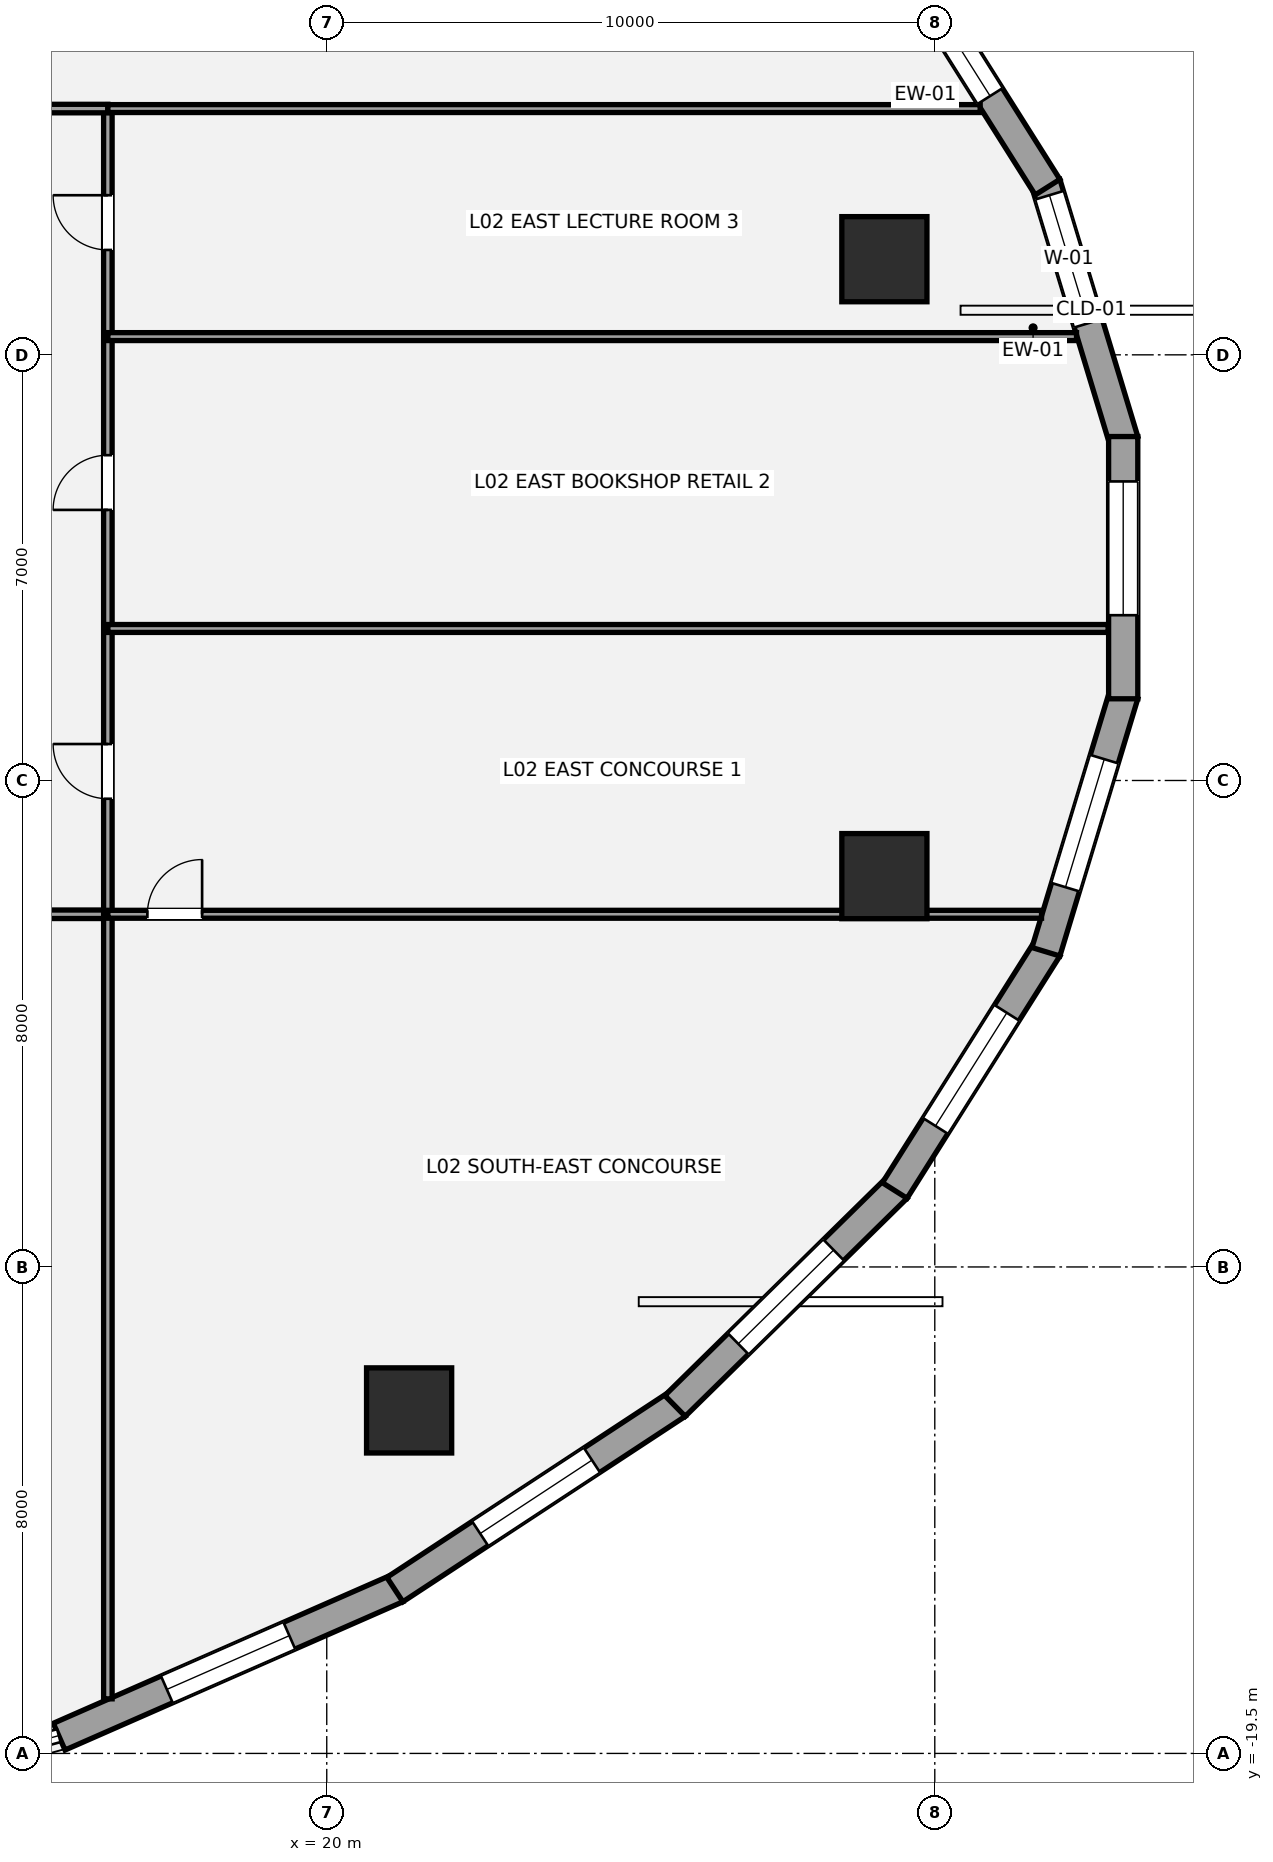
"""IFC4 building model, lengths in metres.
Left out: names, types, materials, properties, quantities, classifications, styles, units other than length and angle.
Written with IfcOpenShell. Run it as: python <this file> out.ifc"""

import sys

from ifc_helpers import new_model, si_unit, direction, frame, frame_2d, origin, origin_2d, place, context, subcontext, project, spatial, rectangle, hollow_circle, extrude, element, fill, save


model = new_model("IFC4")
c1 = context("Model", 3, precision=1e-05, world=origin(), true_north=direction((0.0, 1.0)))
c2 = subcontext(c1, "Body", "Model", "MODEL_VIEW")
j1 = project(units=[si_unit("LENGTHUNIT", "METRE"), si_unit("PLANEANGLEUNIT", "RADIAN")], contexts=[c1])
p1 = place(None, origin())
s1 = spatial("IfcSite", under=j1, at=p1, CompositionType="ELEMENT")
p2 = place(p1, origin())
s2 = spatial("IfcBuilding", under=s1, at=p2, CompositionType="ELEMENT")
p3 = place(p2, frame((0.0, 0.0, 10.2)))
s3 = spatial("IfcBuildingStorey", under=s2, at=p3, CompositionType="ELEMENT", Elevation=10.2)
for number, where, z_axis, x_axis in (
    (1, (29.171, 5.073, 0.0), (0.0, 0.0, 1.0), (1.0, 0.0, 0.0)),
    (2, (21.354, -13.859, 0.0), (0.0, 0.0, 1.0), (1.0, 0.0, 0.0)),
    (3, (29.171, -5.073, 0.0), (0.0, 0.0, 1.0), (1.0, 0.0, 0.0)),
):
    element("IfcColumn", number, at=place(p3, frame(where, z_axis=z_axis, x_axis=x_axis)), inside=s3, PredefinedType="USERDEFINED", context=c2, shape_type="SweptSolid", body=[
        extrude(hollow_circle(Radius=0.7, WallThickness=0.05, at=origin_2d()), origin(), (0.0, 0.0, 1.0), 4.2),
    ])
p4 = place(p3, frame((31.828, 6.317, 0.0), z_axis=(0.0, 0.0, 1.0), x_axis=(0.289855603468, -0.957070388811, 0.0)))
e4 = element("IfcWall", 4, at=p4, inside=s3, PredefinedType="STANDARD", context=c2, shape_type="SweptSolid", body=[
    extrude(rectangle(XDim=4.419, YDim=0.48, at=frame_2d((2.21, 0.0))), origin(), (0.0, 0.0, 1.0), 3.109),
])
p5 = place(p4, frame((0.2, 0.0, 0.7)))
e5 = element("IfcOpeningElement", 5, at=p5, cuts=e4, PredefinedType="OPENING", context=c2, shape_type="SweptSolid", body=[
    extrude(rectangle(XDim=2.2, YDim=1.95, at=frame_2d((1.1, 0.975))), frame((0.0, 0.25, 0.0), z_axis=(0.0, -1.0, 0.0), x_axis=(1.0, 0.0, 0.0)), (0.0, 0.0, 1.0), 0.5),
])
p6 = place(p3, frame((29.341, 10.243, 0.0), z_axis=(0.0, 0.0, 1.0), x_axis=(0.53349762721, -0.845801561693, 0.0)))
e6 = element("IfcWall", 6, at=p6, inside=s3, PredefinedType="STANDARD", context=c2, shape_type="SweptSolid", body=[
    extrude(rectangle(XDim=4.711, YDim=0.48, at=frame_2d((2.355, 0.0))), origin(), (0.0, 0.0, 1.0), 3.109),
])
p7 = place(p6, frame((0.74, 0.0, 0.7)))
e7 = element("IfcOpeningElement", 7, at=p7, cuts=e6, PredefinedType="OPENING", context=c2, shape_type="SweptSolid", body=[
    extrude(rectangle(XDim=2.2, YDim=1.95, at=frame_2d((1.1, 0.975))), frame((0.0, 0.25, 0.0), z_axis=(0.0, -1.0, 0.0), x_axis=(1.0, 0.0, 0.0)), (0.0, 0.0, 1.0), 0.5),
])
p8 = place(p3, frame((21.156, -16.786, 0.0), z_axis=(0.0, 0.0, 1.0), x_axis=(-0.915720949248, -0.401814811957, 0.0)))
e8 = element("IfcWall", 8, at=p8, inside=s3, PredefinedType="STANDARD", context=c2, shape_type="SweptSolid", body=[
    extrude(rectangle(XDim=6.068, YDim=0.48, at=frame_2d((3.034, 0.0))), origin(), (0.0, 0.0, 1.0), 3.109),
])
p9 = place(p8, frame((1.934, 0.0, 0.7)))
e9 = element("IfcOpeningElement", 9, at=p9, cuts=e8, PredefinedType="OPENING", context=c2, shape_type="SweptSolid", body=[
    extrude(rectangle(XDim=2.2, YDim=1.95, at=frame_2d((1.1, 0.975))), frame((0.0, 0.25, 0.0), z_axis=(0.0, -1.0, 0.0), x_axis=(1.0, 0.0, 0.0)), (0.0, 0.0, 1.0), 0.5),
])
p10 = place(p3, frame((25.764, -13.756, 0.0), z_axis=(0.0, 0.0, 1.0), x_axis=(-0.835863918172, -0.548936708827, 0.0)))
e10 = element("IfcWall", 10, at=p10, inside=s3, PredefinedType="STANDARD", context=c2, shape_type="SweptSolid", body=[
    extrude(rectangle(XDim=5.555, YDim=0.48, at=frame_2d((2.778, 0.0))), origin(), (0.0, 0.0, 1.0), 3.109),
])
p11 = place(p10, frame((1.678, 0.0, 0.7)))
e11 = element("IfcOpeningElement", 11, at=p11, cuts=e10, PredefinedType="OPENING", context=c2, shape_type="SweptSolid", body=[
    extrude(rectangle(XDim=2.2, YDim=1.95, at=frame_2d((1.1, 0.975))), frame((0.0, 0.25, 0.0), z_axis=(0.0, -1.0, 0.0), x_axis=(1.0, 0.0, 0.0)), (0.0, 0.0, 1.0), 0.5),
])
p12 = place(p3, frame((29.376, -10.199, 0.0), z_axis=(0.0, 0.0, 1.0), x_axis=(-0.713189080178, -0.700971708355, 0.0)))
e12 = element("IfcWall", 12, at=p12, inside=s3, PredefinedType="STANDARD", context=c2, shape_type="SweptSolid", body=[
    extrude(rectangle(XDim=5.116, YDim=0.48, at=frame_2d((2.558, 0.0))), origin(), (0.0, 0.0, 1.0), 3.109),
])
p13 = place(p12, frame((1.458, 0.0, 0.7)))
e13 = element("IfcOpeningElement", 13, at=p13, cuts=e12, PredefinedType="OPENING", context=c2, shape_type="SweptSolid", body=[
    extrude(rectangle(XDim=2.2, YDim=1.95, at=frame_2d((1.1, 0.975))), frame((0.0, 0.25, 0.0), z_axis=(0.0, -1.0, 0.0), x_axis=(1.0, 0.0, 0.0)), (0.0, 0.0, 1.0), 0.5),
])
p14 = place(p3, frame((31.854, -6.258, 0.0), z_axis=(0.0, 0.0, 1.0), x_axis=(-0.53349762721, -0.845801561693, 0.0)))
e14 = element("IfcWall", 14, at=p14, inside=s3, PredefinedType="STANDARD", context=c2, shape_type="SweptSolid", body=[
    extrude(rectangle(XDim=4.711, YDim=0.48, at=frame_2d((2.355, 0.0))), origin(), (0.0, 0.0, 1.0), 3.109),
])
p15 = place(p14, frame((1.255, 0.0, 0.7)))
e15 = element("IfcOpeningElement", 15, at=p15, cuts=e14, PredefinedType="OPENING", context=c2, shape_type="SweptSolid", body=[
    extrude(rectangle(XDim=2.2, YDim=1.95, at=frame_2d((1.1, 0.975))), frame((0.0, 0.25, 0.0), z_axis=(0.0, -1.0, 0.0), x_axis=(1.0, 0.0, 0.0)), (0.0, 0.0, 1.0), 0.5),
])
p16 = place(p3, frame((33.109, -2.087, 0.0), z_axis=(0.0, 0.0, 1.0), x_axis=(-0.289855603468, -0.957070388811, 0.0)))
e16 = element("IfcWall", 16, at=p16, inside=s3, PredefinedType="STANDARD", context=c2, shape_type="SweptSolid", body=[
    extrude(rectangle(XDim=4.419, YDim=0.48, at=frame_2d((2.21, 0.0))), origin(), (0.0, 0.0, 1.0), 3.109),
])
p17 = place(p16, frame((1.11, 0.0, 0.7)))
e17 = element("IfcOpeningElement", 17, at=p17, cuts=e16, PredefinedType="OPENING", context=c2, shape_type="SweptSolid", body=[
    extrude(rectangle(XDim=2.2, YDim=1.95, at=frame_2d((1.1, 0.975))), frame((0.0, 0.25, 0.0), z_axis=(0.0, -1.0, 0.0), x_axis=(1.0, 0.0, 0.0)), (0.0, 0.0, 1.0), 0.5),
])
p18 = place(p3, frame((33.099, 2.156, 0.0), z_axis=(0.0, 0.0, 1.0), x_axis=(0.0, -1.0, 0.0)))
e18 = element("IfcWall", 18, at=p18, inside=s3, PredefinedType="STANDARD", context=c2, shape_type="SweptSolid", body=[
    extrude(rectangle(XDim=4.313, YDim=0.48, at=frame_2d((2.156, 0.0))), origin(), (0.0, 0.0, 1.0), 3.109),
])
p19 = place(p18, frame((0.738, 0.0, 0.7)))
e19 = element("IfcOpeningElement", 19, at=p19, cuts=e18, PredefinedType="OPENING", context=c2, shape_type="SweptSolid", body=[
    extrude(rectangle(XDim=2.2, YDim=1.95, at=frame_2d((1.1, 0.975))), frame((0.0, 0.25, 0.0), z_axis=(0.0, -1.0, 0.0), x_axis=(1.0, 0.0, 0.0)), (0.0, 0.0, 1.0), 0.5),
])
p20 = place(p3, frame((-16.4, -5.7, 0.0), z_axis=(0.0, 0.0, 1.0), x_axis=(1.0, 0.0, 0.0)))
e20 = element("IfcWall", 20, at=p20, inside=s3, PredefinedType="PARTITIONING", context=c2, shape_type="SweptSolid", body=[
    extrude(rectangle(XDim=32.8, YDim=0.14, at=frame_2d((16.4, 0.0))), origin(), (0.0, 0.0, 1.0), 3.98),
])
p21 = place(p20, frame((4.55, 0.0, 0.0)))
e21 = element("IfcOpeningElement", 21, at=p21, cuts=e20, PredefinedType="OPENING", context=c2, shape_type="SweptSolid", body=[
    extrude(rectangle(XDim=0.9, YDim=2.1, at=frame_2d((0.45, 1.05))), frame((0.0, 0.08, 0.0), z_axis=(0.0, -1.0, 0.0), x_axis=(1.0, 0.0, 0.0)), (0.0, 0.0, 1.0), 0.16),
])
p22 = place(p20, frame((15.95, 0.0, 0.0)))
e22 = element("IfcOpeningElement", 22, at=p22, cuts=e20, PredefinedType="OPENING", context=c2, shape_type="SweptSolid", body=[
    extrude(rectangle(XDim=0.9, YDim=2.1, at=frame_2d((0.45, 1.05))), frame((0.0, 0.08, 0.0), z_axis=(0.0, -1.0, 0.0), x_axis=(1.0, 0.0, 0.0)), (0.0, 0.0, 1.0), 0.16),
])
p23 = place(p20, frame((27.05, 0.0, 0.0)))
e23 = element("IfcOpeningElement", 23, at=p23, cuts=e20, PredefinedType="OPENING", context=c2, shape_type="SweptSolid", body=[
    extrude(rectangle(XDim=1.5, YDim=2.15, at=frame_2d((0.75, 1.075))), frame((0.0, 0.08, 0.0), z_axis=(0.0, -1.0, 0.0), x_axis=(1.0, 0.0, 0.0)), (0.0, 0.0, 1.0), 0.16),
])
p24 = place(p3, frame((16.4, -18.603, 0.0), z_axis=(0.0, 0.0, 1.0), x_axis=(0.0, 1.0, 0.0)))
e24 = element("IfcWall", 24, at=p24, inside=s3, PredefinedType="PARTITIONING", context=c2, shape_type="SweptSolid", body=[
    extrude(rectangle(XDim=26.153, YDim=0.14, at=frame_2d((13.076, 0.0))), origin(), (0.0, 0.0, 1.0), 3.348),
])
p25 = place(p24, frame((14.802, 0.0, 0.0)))
e25 = element("IfcOpeningElement", 25, at=p25, cuts=e24, PredefinedType="OPENING", context=c2, shape_type="SweptSolid", body=[
    extrude(rectangle(XDim=0.9, YDim=2.1, at=frame_2d((0.45, 1.05))), frame((0.0, 0.08, 0.0), z_axis=(0.0, -1.0, 0.0), x_axis=(1.0, 0.0, 0.0)), (0.0, 0.0, 1.0), 0.16),
])
p26 = place(p24, frame((19.552, 0.0, 0.0)))
e26 = element("IfcOpeningElement", 26, at=p26, cuts=e24, PredefinedType="OPENING", context=c2, shape_type="SweptSolid", body=[
    extrude(rectangle(XDim=0.9, YDim=2.1, at=frame_2d((0.45, 1.05))), frame((0.0, 0.08, 0.0), z_axis=(0.0, -1.0, 0.0), x_axis=(1.0, 0.0, 0.0)), (0.0, 0.0, 1.0), 0.16),
])
p27 = place(p24, frame((23.827, 0.0, 0.0)))
e27 = element("IfcOpeningElement", 27, at=p27, cuts=e24, PredefinedType="OPENING", context=c2, shape_type="SweptSolid", body=[
    extrude(rectangle(XDim=0.9, YDim=2.1, at=frame_2d((0.45, 1.05))), frame((0.0, 0.08, 0.0), z_axis=(0.0, -1.0, 0.0), x_axis=(1.0, 0.0, 0.0)), (0.0, 0.0, 1.0), 0.16),
])
p28 = place(p3, frame((14.05, 7.55, 0.0), z_axis=(0.0, 0.0, 1.0), x_axis=(1.0, 0.0, 0.0)))
e28 = element("IfcWall", 28, at=p28, inside=s3, PredefinedType="PARTITIONING", context=c2, shape_type="SweptSolid", body=[
    extrude(rectangle(XDim=2.35, YDim=0.14, at=frame_2d((1.175, 0.0))), origin(), (0.0, 0.0, 1.0), 3.433),
])
p29 = place(p28, frame((0.32, 0.0, 0.0)))
e29 = element("IfcOpeningElement", 29, at=p29, cuts=e28, PredefinedType="OPENING", context=c2, shape_type="SweptSolid", body=[
    extrude(rectangle(XDim=0.92, YDim=2.15, at=frame_2d((0.46, 1.075))), frame((0.0, 0.08, 0.0), z_axis=(0.0, -1.0, 0.0), x_axis=(1.0, 0.0, 0.0)), (0.0, 0.0, 1.0), 0.16),
])
p30 = place(p3, frame((16.4, 7.55, 0.0), z_axis=(0.0, 0.0, 1.0), x_axis=(1.0, 0.0, 0.0)))
e30 = element("IfcWall", 30, at=p30, inside=s3, PredefinedType="PARTITIONING", context=c2, shape_type="SweptSolid", body=[
    extrude(rectangle(XDim=14.347, YDim=0.13, at=frame_2d((7.173, 0.0))), origin(), (0.0, 0.0, 1.0), 2.958),
])
p31 = place(p3, frame((16.4, -5.7, 0.0), z_axis=(0.0, 0.0, 1.0), x_axis=(1.0, 0.0, 0.0)))
e31 = element("IfcWall", 31, at=p31, inside=s3, PredefinedType="PARTITIONING", context=c2, shape_type="SweptSolid", body=[
    extrude(rectangle(XDim=15.356, YDim=0.13, at=frame_2d((7.678, 0.0))), origin(), (0.0, 0.0, 1.0), 2.958),
])
p32 = place(p31, frame((0.65, 0.0, 0.0)))
e32 = element("IfcOpeningElement", 32, at=p32, cuts=e31, PredefinedType="OPENING", context=c2, shape_type="SweptSolid", body=[
    extrude(rectangle(XDim=0.9, YDim=2.1, at=frame_2d((0.45, 1.05))), frame((0.0, 0.075, 0.0), z_axis=(0.0, -1.0, 0.0), x_axis=(1.0, 0.0, 0.0)), (0.0, 0.0, 1.0), 0.15),
])
p33 = place(p3, frame((16.4, -1.0, 0.0), z_axis=(0.0, 0.0, 1.0), x_axis=(1.0, 0.0, 0.0)))
e33 = element("IfcWall", 33, at=p33, inside=s3, PredefinedType="PARTITIONING", context=c2, shape_type="SweptSolid", body=[
    extrude(rectangle(XDim=16.451, YDim=0.13, at=frame_2d((8.225, 0.0))), origin(), (0.0, 0.0, 1.0), 3.348),
])
p34 = place(p3, frame((16.4, 3.8, 0.0), z_axis=(0.0, 0.0, 1.0), x_axis=(1.0, 0.0, 0.0)))
e34 = element("IfcWall", 34, at=p34, inside=s3, PredefinedType="PARTITIONING", context=c2, shape_type="SweptSolid", body=[
    extrude(rectangle(XDim=15.931, YDim=0.13, at=frame_2d((7.966, 0.0))), origin(), (0.0, 0.0, 1.0), 3.348),
])
p35 = place(p5, origin())
e35 = element("IfcWindow", 35, at=p35, inside=s3, PartitioningType="SINGLE_PANEL", PredefinedType="WINDOW", context=c2, shape_type="SweptSolid", body=[
    extrude(rectangle(XDim=2.2, YDim=1.95, at=frame_2d((1.1, 0.975))), frame((0.0, -0.01, 0.0), z_axis=(0.0, -1.0, 0.0), x_axis=(1.0, 0.0, 0.0)), (0.0, 0.0, 1.0), 0.06),
])
fill(e5, e35)
p36 = place(p7, origin())
e36 = element("IfcWindow", 36, at=p36, inside=s3, PartitioningType="SINGLE_PANEL", PredefinedType="WINDOW", context=c2, shape_type="SweptSolid", body=[
    extrude(rectangle(XDim=2.2, YDim=1.95, at=frame_2d((1.1, 0.975))), frame((0.0, -0.01, 0.0), z_axis=(0.0, -1.0, 0.0), x_axis=(1.0, 0.0, 0.0)), (0.0, 0.0, 1.0), 0.06),
])
fill(e7, e36)
p37 = place(p9, origin())
e37 = element("IfcWindow", 37, at=p37, inside=s3, PartitioningType="SINGLE_PANEL", PredefinedType="WINDOW", context=c2, shape_type="SweptSolid", body=[
    extrude(rectangle(XDim=2.2, YDim=1.95, at=frame_2d((1.1, 0.975))), frame((0.0, -0.01, 0.0), z_axis=(0.0, -1.0, 0.0), x_axis=(1.0, 0.0, 0.0)), (0.0, 0.0, 1.0), 0.06),
])
fill(e9, e37)
p38 = place(p11, origin())
e38 = element("IfcWindow", 38, at=p38, inside=s3, PartitioningType="SINGLE_PANEL", PredefinedType="WINDOW", context=c2, shape_type="SweptSolid", body=[
    extrude(rectangle(XDim=2.2, YDim=1.95, at=frame_2d((1.1, 0.975))), frame((0.0, -0.01, 0.0), z_axis=(0.0, -1.0, 0.0), x_axis=(1.0, 0.0, 0.0)), (0.0, 0.0, 1.0), 0.06),
])
fill(e11, e38)
p39 = place(p13, origin())
e39 = element("IfcWindow", 39, at=p39, inside=s3, PartitioningType="SINGLE_PANEL", PredefinedType="WINDOW", context=c2, shape_type="SweptSolid", body=[
    extrude(rectangle(XDim=2.2, YDim=1.95, at=frame_2d((1.1, 0.975))), frame((0.0, -0.01, 0.0), z_axis=(0.0, -1.0, 0.0), x_axis=(1.0, 0.0, 0.0)), (0.0, 0.0, 1.0), 0.06),
])
fill(e13, e39)
p40 = place(p15, origin())
e40 = element("IfcWindow", 40, at=p40, inside=s3, PartitioningType="SINGLE_PANEL", PredefinedType="WINDOW", context=c2, shape_type="SweptSolid", body=[
    extrude(rectangle(XDim=2.2, YDim=1.95, at=frame_2d((1.1, 0.975))), frame((0.0, -0.01, 0.0), z_axis=(0.0, -1.0, 0.0), x_axis=(1.0, 0.0, 0.0)), (0.0, 0.0, 1.0), 0.06),
])
fill(e15, e40)
p41 = place(p17, origin())
e41 = element("IfcWindow", 41, at=p41, inside=s3, PartitioningType="SINGLE_PANEL", PredefinedType="WINDOW", context=c2, shape_type="SweptSolid", body=[
    extrude(rectangle(XDim=2.2, YDim=1.95, at=frame_2d((1.1, 0.975))), frame((0.0, -0.01, 0.0), z_axis=(0.0, -1.0, 0.0), x_axis=(1.0, 0.0, 0.0)), (0.0, 0.0, 1.0), 0.06),
])
fill(e17, e41)
p42 = place(p19, origin())
e42 = element("IfcWindow", 42, at=p42, inside=s3, PartitioningType="SINGLE_PANEL", PredefinedType="WINDOW", context=c2, shape_type="SweptSolid", body=[
    extrude(rectangle(XDim=2.2, YDim=1.95, at=frame_2d((1.1, 0.975))), frame((0.0, -0.01, 0.0), z_axis=(0.0, -1.0, 0.0), x_axis=(1.0, 0.0, 0.0)), (0.0, 0.0, 1.0), 0.06),
])
fill(e19, e42)
p43 = place(p32, origin())
e43 = element("IfcDoor", 43, at=p43, inside=s3, OperationType="SINGLE_SWING_RIGHT", PredefinedType="DOOR", context=c2, shape_type="SweptSolid", body=[
    extrude(rectangle(XDim=0.9, YDim=2.1, at=frame_2d((0.45, 1.05))), frame((0.0, 0.025, 0.0), z_axis=(0.0, -1.0, 0.0), x_axis=(1.0, 0.0, 0.0)), (0.0, 0.0, 1.0), 0.05),
])
fill(e32, e43)
p44 = place(p25, origin())
e44 = element("IfcDoor", 44, at=p44, inside=s3, OperationType="SINGLE_SWING_RIGHT", PredefinedType="DOOR", context=c2, shape_type="SweptSolid", body=[
    extrude(rectangle(XDim=0.9, YDim=2.1, at=frame_2d((0.45, 1.05))), frame((0.0, 0.025, 0.0), z_axis=(0.0, -1.0, 0.0), x_axis=(1.0, 0.0, 0.0)), (0.0, 0.0, 1.0), 0.05),
])
fill(e25, e44)
p45 = place(p26, origin())
e45 = element("IfcDoor", 45, at=p45, inside=s3, OperationType="SINGLE_SWING_LEFT", PredefinedType="DOOR", context=c2, shape_type="SweptSolid", body=[
    extrude(rectangle(XDim=0.9, YDim=2.1, at=frame_2d((0.45, 1.05))), frame((0.0, 0.025, 0.0), z_axis=(0.0, -1.0, 0.0), x_axis=(1.0, 0.0, 0.0)), (0.0, 0.0, 1.0), 0.05),
])
fill(e26, e45)
p46 = place(p27, origin())
e46 = element("IfcDoor", 46, at=p46, inside=s3, OperationType="SINGLE_SWING_RIGHT", PredefinedType="DOOR", context=c2, shape_type="SweptSolid", body=[
    extrude(rectangle(XDim=0.9, YDim=2.1, at=frame_2d((0.45, 1.05))), frame((0.0, 0.025, 0.0), z_axis=(0.0, -1.0, 0.0), x_axis=(1.0, 0.0, 0.0)), (0.0, 0.0, 1.0), 0.05),
])
fill(e27, e46)
save(model, sys.argv[1])
